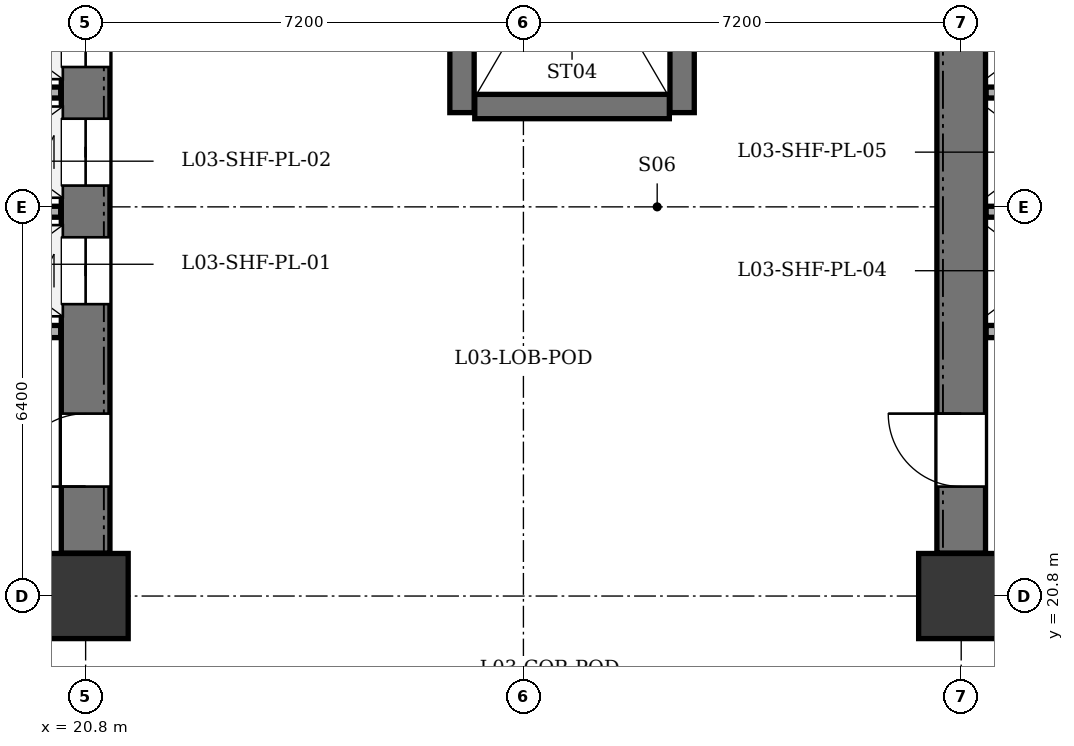
"""IFC4 building model, lengths in metres.
Left out: names, types, materials, properties, quantities, classifications, styles, units other than length and angle.
Written with IfcOpenShell. Run it as: python <this file> out.ifc"""

import sys

from ifc_helpers import new_model, si_unit, direction, frame, frame_2d, origin, origin_2d, place, context, subcontext, project, spatial, rectangle, extrude, element, fill, save


model = new_model("IFC4")
c1 = context("Model", 3, precision=1e-05, world=origin(), true_north=direction((0.0, 1.0)))
c2 = subcontext(c1, "Body", "Model", "MODEL_VIEW")
j1 = project(units=[si_unit("LENGTHUNIT", "METRE"), si_unit("PLANEANGLEUNIT", "RADIAN")], contexts=[c1])
p1 = place(None, origin())
s1 = spatial("IfcSite", under=j1, at=p1, CompositionType="ELEMENT")
p2 = place(p1, origin())
s2 = spatial("IfcBuilding", under=s1, at=p2, CompositionType="ELEMENT")
p3 = place(p2, frame((0.0, 0.0, 14.4)))
s3 = spatial("IfcBuildingStorey", under=s2, at=p3, CompositionType="ELEMENT", Elevation=14.4)
for number, where, z_axis, x_axis in (
    (1, (20.8, 20.8, 0.0), (0.0, 0.0, 1.0), (1.0, 0.0, 0.0)),
    (2, (35.2, 20.8, 0.0), (0.0, 0.0, 1.0), (1.0, 0.0, 0.0)),
):
    element("IfcColumn", number, at=place(p3, frame(where, z_axis=z_axis, x_axis=x_axis)), inside=s3, PredefinedType="COLUMN", context=c2, shape_type="SweptSolid", body=[
        extrude(rectangle(XDim=1.4, YDim=1.4, at=origin_2d()), origin(), (0.0, 0.0, 1.0), 4.5),
    ])
p4 = place(p3, frame((20.8, 21.505, 0.0), z_axis=(0.0, 0.0, 1.0), x_axis=(0.0, 1.0, 0.0)))
e3 = element("IfcWall", 3, at=p4, inside=s3, PredefinedType="SHEAR", context=c2, shape_type="SweptSolid", body=[
    extrude(rectangle(XDim=11.39, YDim=0.8, at=frame_2d((5.695, 0.0))), origin(), (0.0, 0.0, 1.0), 4.0),
])
p5 = place(p4, frame((1.095, 0.0, 0.0)))
e4 = element("IfcOpeningElement", 4, at=p5, cuts=e3, PredefinedType="OPENING", context=c2, shape_type="SweptSolid", body=[
    extrude(rectangle(XDim=1.2, YDim=2.15, at=frame_2d((0.6, 1.075))), frame((0.0, 0.41, 0.0), z_axis=(0.0, -1.0, 0.0), x_axis=(1.0, 0.0, 0.0)), (0.0, 0.0, 1.0), 0.82),
])
p6 = place(p4, frame((4.095, 0.0, 0.0)))
e5 = element("IfcOpeningElement", 5, at=p6, cuts=e3, PredefinedType="OPENING", context=c2, shape_type="SweptSolid", body=[
    extrude(rectangle(XDim=1.1, YDim=2.1, at=frame_2d((0.55, 1.05))), frame((0.0, 0.41, 0.0), z_axis=(0.0, -1.0, 0.0), x_axis=(1.0, 0.0, 0.0)), (0.0, 0.0, 1.0), 0.82),
])
p7 = place(p4, frame((6.045, 0.0, 0.0)))
e6 = element("IfcOpeningElement", 6, at=p7, cuts=e3, PredefinedType="OPENING", context=c2, shape_type="SweptSolid", body=[
    extrude(rectangle(XDim=1.1, YDim=2.1, at=frame_2d((0.55, 1.05))), frame((0.0, 0.41, 0.0), z_axis=(0.0, -1.0, 0.0), x_axis=(1.0, 0.0, 0.0)), (0.0, 0.0, 1.0), 0.82),
])
p8 = place(p4, frame((7.995, 0.0, 0.0)))
e7 = element("IfcOpeningElement", 7, at=p8, cuts=e3, PredefinedType="OPENING", context=c2, shape_type="SweptSolid", body=[
    extrude(rectangle(XDim=1.1, YDim=2.1, at=frame_2d((0.55, 1.05))), frame((0.0, 0.41, 0.0), z_axis=(0.0, -1.0, 0.0), x_axis=(1.0, 0.0, 0.0)), (0.0, 0.0, 1.0), 0.82),
])
p9 = place(p4, frame((10.195, 0.0, 0.0)))
e8 = element("IfcOpeningElement", 8, at=p9, cuts=e3, PredefinedType="OPENING", context=c2, shape_type="SweptSolid", body=[
    extrude(rectangle(XDim=1.1, YDim=2.1, at=frame_2d((0.55, 1.05))), frame((0.0, 0.41, 0.0), z_axis=(0.0, -1.0, 0.0), x_axis=(1.0, 0.0, 0.0)), (0.0, 0.0, 1.0), 0.82),
])
p10 = place(p3, frame((16.6, 25.15, 0.0), z_axis=(0.0, 0.0, 1.0), x_axis=(1.0, 0.0, 0.0)))
e9 = element("IfcWall", 9, at=p10, inside=s3, PredefinedType="SOLIDWALL", context=c2, shape_type="SweptSolid", body=[
    extrude(rectangle(XDim=3.79, YDim=0.2, at=frame_2d((1.895, 0.0))), origin(), (0.0, 0.0, 1.0), 4.0),
])
p11 = place(p10, frame((0.3, 0.0, 0.0)))
e10 = element("IfcOpeningElement", 10, at=p11, cuts=e9, PredefinedType="OPENING", context=c2, shape_type="SweptSolid", body=[
    extrude(rectangle(XDim=0.85, YDim=2.02, at=frame_2d((0.425, 1.01))), frame((0.0, 0.11, 0.0), z_axis=(0.0, -1.0, 0.0), x_axis=(1.0, 0.0, 0.0)), (0.0, 0.0, 1.0), 0.22),
])
for number, where, z_axis, x_axis in (
    (11, (18.22, 27.12, 0.0), (0.0, 0.0, 1.0), (1.0, 0.0, 0.0)),
    (12, (18.22, 29.08, 0.0), (0.0, 0.0, 1.0), (1.0, 0.0, 0.0)),
):
    element("IfcWall", number, at=place(p3, frame(where, z_axis=z_axis, x_axis=x_axis)), inside=s3, PredefinedType="PARTITIONING", context=c2, shape_type="SweptSolid", body=[
        extrude(rectangle(XDim=2.17, YDim=0.18, at=frame_2d((1.085, 0.0))), origin(), (0.0, 0.0, 1.0), 4.0),
    ])
p12 = place(p3, frame((35.2, 21.505, 0.0), z_axis=(0.0, 0.0, 1.0), x_axis=(0.0, 1.0, 0.0)))
e13 = element("IfcWall", 13, at=p12, inside=s3, PredefinedType="SHEAR", context=c2, shape_type="SweptSolid", body=[
    extrude(rectangle(XDim=11.39, YDim=0.8, at=frame_2d((5.695, 0.0))), origin(), (0.0, 0.0, 1.0), 4.0),
])
p13 = place(p12, frame((1.095, 0.0, 0.0)))
e14 = element("IfcOpeningElement", 14, at=p13, cuts=e13, PredefinedType="OPENING", context=c2, shape_type="SweptSolid", body=[
    extrude(rectangle(XDim=1.2, YDim=2.15, at=frame_2d((0.6, 1.075))), frame((0.0, 0.41, 0.0), z_axis=(0.0, -1.0, 0.0), x_axis=(1.0, 0.0, 0.0)), (0.0, 0.0, 1.0), 0.82),
])
p14 = place(p12, frame((10.195, 0.0, 0.0)))
e15 = element("IfcOpeningElement", 15, at=p14, cuts=e13, PredefinedType="OPENING", context=c2, shape_type="SweptSolid", body=[
    extrude(rectangle(XDim=1.1, YDim=2.1, at=frame_2d((0.55, 1.05))), frame((0.0, 0.41, 0.0), z_axis=(0.0, -1.0, 0.0), x_axis=(1.0, 0.0, 0.0)), (0.0, 0.0, 1.0), 0.82),
])
p15 = place(p3, frame((35.61, 25.15, 0.0), z_axis=(0.0, 0.0, 1.0), x_axis=(1.0, 0.0, 0.0)))
e16 = element("IfcWall", 16, at=p15, inside=s3, PredefinedType="SOLIDWALL", context=c2, shape_type="SweptSolid", body=[
    extrude(rectangle(XDim=3.79, YDim=0.2, at=frame_2d((1.895, 0.0))), origin(), (0.0, 0.0, 1.0), 4.0),
])
for number, where, z_axis, x_axis in (
    (17, (35.61, 27.12, 0.0), (0.0, 0.0, 1.0), (1.0, 0.0, 0.0)),
    (18, (35.61, 29.08, 0.0), (0.0, 0.0, 1.0), (1.0, 0.0, 0.0)),
):
    element("IfcWall", number, at=place(p3, frame(where, z_axis=z_axis, x_axis=x_axis)), inside=s3, PredefinedType="PARTITIONING", context=c2, shape_type="SweptSolid", body=[
        extrude(rectangle(XDim=2.17, YDim=0.18, at=frame_2d((1.085, 0.0))), origin(), (0.0, 0.0, 1.0), 4.0),
    ])
p16 = place(p3, frame((26.99, 28.75, 0.0), z_axis=(0.0, 0.0, 1.0), x_axis=(0.0, 1.0, 0.0)))
e19 = element("IfcWall", 19, at=p16, inside=s3, PredefinedType="SHEAR", context=c2, shape_type="SweptSolid", body=[
    extrude(rectangle(XDim=7.6, YDim=0.4, at=frame_2d((3.8, 0.0))), origin(), (0.0, 0.0, 1.0), 4.0),
])
p17 = place(p3, frame((30.61, 28.75, 0.0), z_axis=(0.0, 0.0, 1.0), x_axis=(0.0, 1.0, 0.0)))
e20 = element("IfcWall", 20, at=p17, inside=s3, PredefinedType="SHEAR", context=c2, shape_type="SweptSolid", body=[
    extrude(rectangle(XDim=7.6, YDim=0.4, at=frame_2d((3.8, 0.0))), origin(), (0.0, 0.0, 1.0), 4.0),
])
p18 = place(p17, frame((5.7, 0.0, 0.0)))
e21 = element("IfcOpeningElement", 21, at=p18, cuts=e20, PredefinedType="OPENING", context=c2, shape_type="SweptSolid", body=[
    extrude(rectangle(XDim=1.15, YDim=2.15, at=frame_2d((0.575, 1.075))), frame((0.0, 0.21, 0.0), z_axis=(0.0, -1.0, 0.0), x_axis=(1.0, 0.0, 0.0)), (0.0, 0.0, 1.0), 0.42),
])
p19 = place(p3, frame((27.2, 28.85, 0.0), z_axis=(0.0, 0.0, 1.0), x_axis=(1.0, 0.0, 0.0)))
e22 = element("IfcWall", 22, at=p19, inside=s3, PredefinedType="SHEAR", context=c2, shape_type="SweptSolid", body=[
    extrude(rectangle(XDim=3.2, YDim=0.4, at=frame_2d((1.6, 0.0))), origin(), (0.0, 0.0, 1.0), 4.0),
])
p20 = place(p5, origin())
e23 = element("IfcDoor", 23, at=p20, inside=s3, OperationType="SINGLE_SWING_LEFT", PredefinedType="DOOR", context=c2, shape_type="SweptSolid", body=[
    extrude(rectangle(XDim=1.2, YDim=2.15, at=frame_2d((0.6, 1.075))), frame((0.0, 0.025, 0.0), z_axis=(0.0, -1.0, 0.0), x_axis=(1.0, 0.0, 0.0)), (0.0, 0.0, 1.0), 0.05),
])
fill(e4, e23)
p21 = place(p6, origin())
e24 = element("IfcDoor", 24, at=p21, inside=s3, OperationType="DOUBLE_DOOR_SLIDING", PredefinedType="DOOR", context=c2, shape_type="SweptSolid", body=[
    extrude(rectangle(XDim=1.1, YDim=2.1, at=frame_2d((0.55, 1.05))), frame((0.0, 0.025, 0.0), z_axis=(0.0, -1.0, 0.0), x_axis=(1.0, 0.0, 0.0)), (0.0, 0.0, 1.0), 0.05),
])
fill(e5, e24)
p22 = place(p7, origin())
e25 = element("IfcDoor", 25, at=p22, inside=s3, OperationType="DOUBLE_DOOR_SLIDING", PredefinedType="DOOR", context=c2, shape_type="SweptSolid", body=[
    extrude(rectangle(XDim=1.1, YDim=2.1, at=frame_2d((0.55, 1.05))), frame((0.0, 0.025, 0.0), z_axis=(0.0, -1.0, 0.0), x_axis=(1.0, 0.0, 0.0)), (0.0, 0.0, 1.0), 0.05),
])
fill(e6, e25)
p23 = place(p8, origin())
e26 = element("IfcDoor", 26, at=p23, inside=s3, OperationType="DOUBLE_DOOR_SLIDING", PredefinedType="DOOR", context=c2, shape_type="SweptSolid", body=[
    extrude(rectangle(XDim=1.1, YDim=2.1, at=frame_2d((0.55, 1.05))), frame((0.0, 0.025, 0.0), z_axis=(0.0, -1.0, 0.0), x_axis=(1.0, 0.0, 0.0)), (0.0, 0.0, 1.0), 0.05),
])
fill(e7, e26)
p24 = place(p13, origin())
e27 = element("IfcDoor", 27, at=p24, inside=s3, OperationType="SINGLE_SWING_RIGHT", PredefinedType="DOOR", context=c2, shape_type="SweptSolid", body=[
    extrude(rectangle(XDim=1.2, YDim=2.15, at=frame_2d((0.6, 1.075))), frame((0.0, 0.025, 0.0), z_axis=(0.0, -1.0, 0.0), x_axis=(1.0, 0.0, 0.0)), (0.0, 0.0, 1.0), 0.05),
])
fill(e14, e27)
save(model, sys.argv[1])
